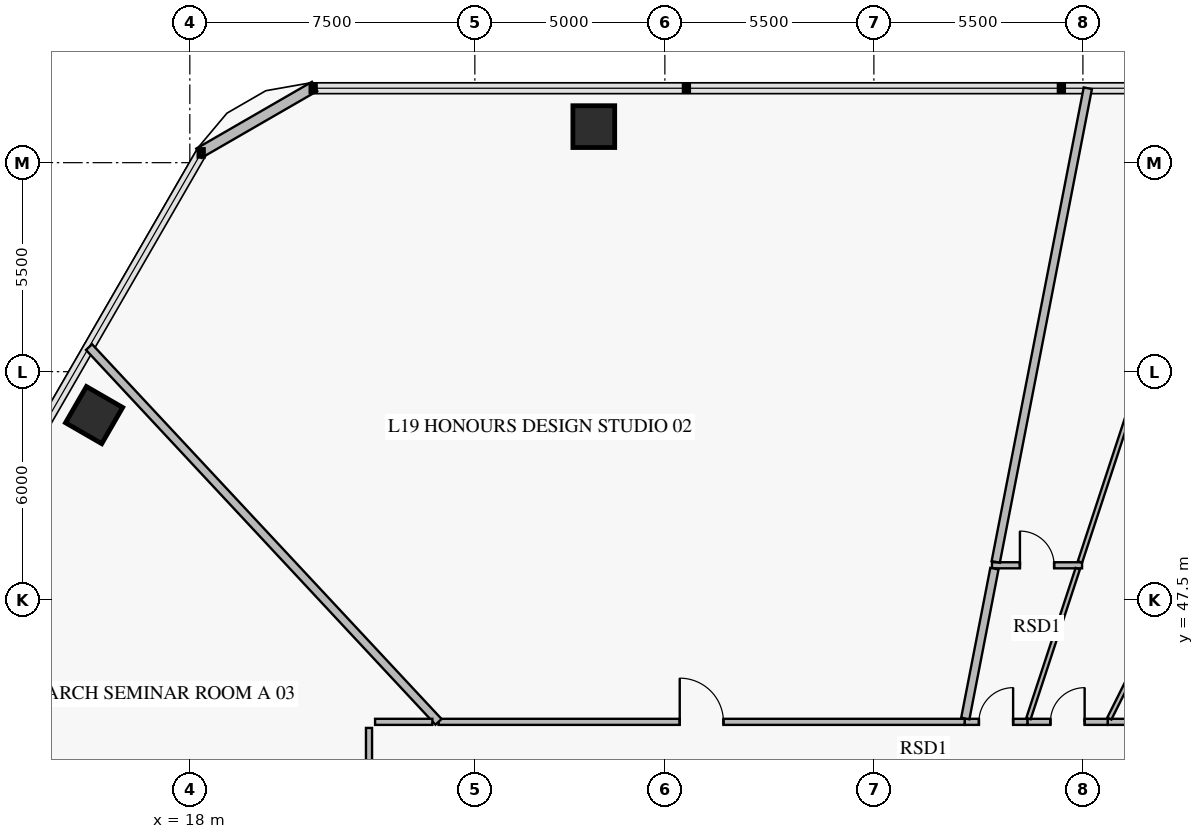
"""IFC4 building model, lengths in metres.
Left out: names, types, materials, properties, quantities, classifications, styles, units other than length and angle.
Written with IfcOpenShell. Run it as: python <this file> out.ifc"""

import sys

from ifc_helpers import new_model, si_unit, direction, frame, frame_2d, origin, origin_2d, place, context, subcontext, project, spatial, rectangle, extrude, element, fill, save


model = new_model("IFC4")
c1 = context("Model", 3, precision=1e-05, world=origin(), true_north=direction((0.0, 1.0)))
c2 = subcontext(c1, "Body", "Model", "MODEL_VIEW")
j1 = project(units=[si_unit("LENGTHUNIT", "METRE"), si_unit("PLANEANGLEUNIT", "RADIAN")], contexts=[c1])
p1 = place(None, origin())
s1 = spatial("IfcSite", under=j1, at=p1, CompositionType="ELEMENT")
p2 = place(p1, origin())
s2 = spatial("IfcBuilding", under=s1, at=p2, CompositionType="ELEMENT")
p3 = place(p2, frame((0.0, 0.0, 79.2)))
s3 = spatial("IfcBuildingStorey", under=s2, at=p3, CompositionType="ELEMENT", Elevation=79.2)
for number, where, z_axis, x_axis in (
    (1, (28.63, 59.948, 0.0), (0.0, 0.0, 1.0), (-1.0, 0.0, 0.0)),
    (2, (15.481, 52.357, 0.0), (0.0, 0.0, 1.0), (-0.5, -0.866, 0.0)),
):
    element("IfcColumn", number, at=place(p3, frame(where, z_axis=z_axis, x_axis=x_axis)), inside=s3, PredefinedType="COLUMN", context=c2, shape_type="SweptSolid", body=[
        extrude(rectangle(XDim=1.1, YDim=1.1, at=origin_2d()), origin(), (0.0, 0.0, 1.0), 3.92),
    ])
p4 = place(p3, frame((18.239, 59.249, 0.0), z_axis=(0.0, 0.0, 1.0), x_axis=(0.866007452331, 0.500031091541, 0.0)))
e3 = element("IfcWall", 3, at=p4, inside=s3, PredefinedType="SOLIDWALL", context=c2, shape_type="SweptSolid", body=[
    extrude(rectangle(XDim=3.515, YDim=0.28, at=frame_2d((1.757, 0.0))), origin(), (0.0, 0.0, 1.0), 3.92),
])
p5 = place(p3, frame((44.602, 44.285, 0.0), z_axis=(0.0, 0.0, 1.0), x_axis=(-1.0, 0.0, 0.0)))
e4 = element("IfcWall", 4, at=p5, inside=s3, PredefinedType="PARTITIONING", context=c2, shape_type="SweptSolid", body=[
    extrude(rectangle(XDim=2.45, YDim=0.16, at=frame_2d((1.225, 0.0))), origin(), (0.0, 0.0, 1.0), 3.92),
])
p6 = place(p5, frame((0.775, 0.0, 0.0)))
e5 = element("IfcOpeningElement", 5, at=p6, cuts=e4, PredefinedType="OPENING", context=c2, shape_type="SweptSolid", body=[
    extrude(rectangle(XDim=0.9, YDim=2.1, at=frame_2d((0.45, 1.05))), frame((0.0, 0.092, 0.0), z_axis=(0.0, -1.0, 0.0), x_axis=(1.0, 0.0, 0.0)), (0.0, 0.0, 1.0), 0.184),
])
p7 = place(p3, frame((42.152, 44.285, 0.0), z_axis=(0.0, 0.0, 1.0), x_axis=(-1.0, 0.0, 0.0)))
e6 = element("IfcWall", 6, at=p7, inside=s3, PredefinedType="PARTITIONING", context=c2, shape_type="SweptSolid", body=[
    extrude(rectangle(XDim=2.113, YDim=0.16, at=frame_2d((1.056, 0.0))), origin(), (0.0, 0.0, 1.0), 3.92),
])
p8 = place(p7, frame((0.606, 0.0, 0.0)))
e7 = element("IfcOpeningElement", 7, at=p8, cuts=e6, PredefinedType="OPENING", context=c2, shape_type="SweptSolid", body=[
    extrude(rectangle(XDim=0.9, YDim=2.1, at=frame_2d((0.45, 1.05))), frame((0.0, 0.092, 0.0), z_axis=(0.0, -1.0, 0.0), x_axis=(1.0, 0.0, 0.0)), (0.0, 0.0, 1.0), 0.184),
])
p9 = place(p3, frame((39.107, 48.405, 0.0), z_axis=(0.0, 0.0, 1.0), x_axis=(1.0, 0.0, 0.0)))
e8 = element("IfcWall", 8, at=p9, inside=s3, PredefinedType="PARTITIONING", context=c2, shape_type="SweptSolid", body=[
    extrude(rectangle(XDim=2.37, YDim=0.16, at=frame_2d((1.185, 0.0))), origin(), (0.0, 0.0, 1.0), 3.22),
])
p10 = place(p9, frame((0.735, 0.0, 0.0)))
e9 = element("IfcOpeningElement", 9, at=p10, cuts=e8, PredefinedType="OPENING", context=c2, shape_type="SweptSolid", body=[
    extrude(rectangle(XDim=0.9, YDim=2.1, at=frame_2d((0.45, 1.05))), frame((0.0, 0.092, 0.0), z_axis=(0.0, -1.0, 0.0), x_axis=(1.0, 0.0, 0.0)), (0.0, 0.0, 1.0), 0.184),
])
p11 = place(p3, frame((40.039, 44.285, 0.0), z_axis=(0.0, 0.0, 1.0), x_axis=(-1.0, 0.0, 0.0)))
e10 = element("IfcWall", 10, at=p11, inside=s3, PredefinedType="PARTITIONING", context=c2, shape_type="SweptSolid", body=[
    extrude(rectangle(XDim=1.651, YDim=0.16, at=frame_2d((0.826, 0.0))), origin(), (0.0, 0.0, 1.0), 3.22),
])
p12 = place(p11, frame((0.375, 0.0, 0.0)))
e11 = element("IfcOpeningElement", 11, at=p12, cuts=e10, PredefinedType="OPENING", context=c2, shape_type="SweptSolid", body=[
    extrude(rectangle(XDim=0.9, YDim=2.1, at=frame_2d((0.45, 1.05))), frame((0.0, 0.092, 0.0), z_axis=(0.0, -1.0, 0.0), x_axis=(1.0, 0.0, 0.0)), (0.0, 0.0, 1.0), 0.184),
])
p13 = place(p3, frame((38.388, 44.285, 0.0), z_axis=(0.0, 0.0, 1.0), x_axis=(-1.0, 0.0, 0.0)))
e12 = element("IfcWall", 12, at=p13, inside=s3, PredefinedType="PARTITIONING", context=c2, shape_type="SweptSolid", body=[
    extrude(rectangle(XDim=13.844, YDim=0.16, at=frame_2d((6.922, 0.0))), origin(), (0.0, 0.0, 1.0), 3.22),
])
p14 = place(p13, frame((6.347, 0.0, 0.0)))
e13 = element("IfcOpeningElement", 13, at=p14, cuts=e12, PredefinedType="OPENING", context=c2, shape_type="SweptSolid", body=[
    extrude(rectangle(XDim=1.15, YDim=2.2, at=frame_2d((0.575, 1.1))), frame((0.0, 0.092, 0.0), z_axis=(0.0, -1.0, 0.0), x_axis=(1.0, 0.0, 0.0)), (0.0, 0.0, 1.0), 0.184),
])
p15 = place(p3, frame((22.715, 44.125, 0.0), z_axis=(0.0, 0.0, 1.0), x_axis=(0.0, -1.0, 0.0)))
e14 = element("IfcWall", 14, at=p15, inside=s3, PredefinedType="PARTITIONING", context=c2, shape_type="SweptSolid", body=[
    extrude(rectangle(XDim=7.29, YDim=0.16, at=frame_2d((3.645, 0.0))), origin(), (0.0, 0.0, 1.0), 3.92),
])
p16 = place(p15, frame((3.07, 0.0, 0.0)))
e15 = element("IfcOpeningElement", 15, at=p16, cuts=e14, PredefinedType="OPENING", context=c2, shape_type="SweptSolid", body=[
    extrude(rectangle(XDim=1.15, YDim=2.2, at=frame_2d((0.575, 1.1))), frame((0.0, 0.092, 0.0), z_axis=(0.0, -1.0, 0.0), x_axis=(1.0, 0.0, 0.0)), (0.0, 0.0, 1.0), 0.184),
])
p17 = place(p3, frame((42.196, 44.373, 0.0), z_axis=(0.0, 0.0, 1.0), x_axis=(0.447750531228, 0.89415852162, 0.0)))
e16 = element("IfcWall", 16, at=p17, inside=s3, PredefinedType="PARTITIONING", context=c2, shape_type="SweptSolid", body=[
    extrude(rectangle(XDim=18.549, YDim=0.12, at=frame_2d((9.274, 0.0))), origin(), (0.0, 0.0, 1.0), 3.17),
])
p18 = place(p3, frame((40.068, 44.373, 0.0), z_axis=(0.0, 0.0, 1.0), x_axis=(0.312326163944, 0.949974929835, 0.0)))
e17 = element("IfcWall", 17, at=p18, inside=s3, PredefinedType="PARTITIONING", context=c2, shape_type="SweptSolid", body=[
    extrude(rectangle(XDim=4.152, YDim=0.12, at=frame_2d((2.076, 0.0))), origin(), (0.0, 0.0, 1.0), 3.92),
])
p19 = place(p3, frame((41.423, 48.493, 0.0), z_axis=(0.0, 0.0, 1.0), x_axis=(0.312329125199, 0.949973956249, 0.0)))
e18 = element("IfcWall", 18, at=p19, inside=s3, PredefinedType="PARTITIONING", context=c2, shape_type="SweptSolid", body=[
    extrude(rectangle(XDim=13.122, YDim=0.12, at=frame_2d((6.561, 0.0))), origin(), (0.0, 0.0, 1.0), 3.17),
])
p20 = place(p3, frame((38.405, 44.373, 0.0), z_axis=(0.0, 0.0, 1.0), x_axis=(0.190807852756, 0.98162740555, 0.0)))
e19 = element("IfcWall", 19, at=p20, inside=s3, PredefinedType="PARTITIONING", context=c2, shape_type="SweptSolid", body=[
    extrude(rectangle(XDim=4.018, YDim=0.22, at=frame_2d((2.009, 0.0))), origin(), (0.0, 0.0, 1.0), 3.92),
])
p21 = place(p3, frame((39.206, 48.493, 0.0), z_axis=(0.0, 0.0, 1.0), x_axis=(0.190811511044, 0.981626694448, 0.0)))
e20 = element("IfcWall", 20, at=p21, inside=s3, PredefinedType="PARTITIONING", context=c2, shape_type="SweptSolid", body=[
    extrude(rectangle(XDim=12.699, YDim=0.22, at=frame_2d((6.35, 0.0))), origin(), (0.0, 0.0, 1.0), 3.17),
])
p22 = place(p3, frame((24.544, 44.285, 0.0), z_axis=(0.0, 0.0, 1.0), x_axis=(-0.68200725148, 0.731345410137, 0.0)))
e21 = element("IfcWall", 21, at=p22, inside=s3, PredefinedType="PARTITIONING", context=c2, shape_type="SweptSolid", body=[
    extrude(rectangle(XDim=13.484, YDim=0.22, at=frame_2d((6.742, 0.0))), origin(), (0.0, 0.0, 1.0), 3.17),
])
p23 = place(p3, frame((24.383, 44.285, 0.0), z_axis=(0.0, 0.0, 1.0), x_axis=(-1.0, 0.0, 0.0)))
e22 = element("IfcWall", 22, at=p23, inside=s3, PredefinedType="PARTITIONING", context=c2, shape_type="SweptSolid", body=[
    extrude(rectangle(XDim=1.508, YDim=0.16, at=frame_2d((0.754, 0.0))), origin(), (0.0, 0.0, 1.0), 3.22),
])
p24 = place(p8, frame((0.9, 0.0, 0.0), z_axis=(0.0, 0.0, 1.0), x_axis=(-1.0, 0.0, 0.0)))
e23 = element("IfcDoor", 23, at=p24, inside=s3, OperationType="SINGLE_SWING_RIGHT", PredefinedType="DOOR", context=c2, shape_type="SweptSolid", body=[
    extrude(rectangle(XDim=0.9, YDim=2.1, at=frame_2d((0.45, 1.05))), frame((0.0, 0.025, 0.0), z_axis=(0.0, -1.0, 0.0), x_axis=(1.0, 0.0, 0.0)), (0.0, 0.0, 1.0), 0.05),
])
fill(e7, e23)
p25 = place(p10, origin())
e24 = element("IfcDoor", 24, at=p25, inside=s3, OperationType="SINGLE_SWING_LEFT", PredefinedType="DOOR", context=c2, shape_type="SweptSolid", body=[
    extrude(rectangle(XDim=0.9, YDim=2.1, at=frame_2d((0.45, 1.05))), frame((0.0, 0.025, 0.0), z_axis=(0.0, -1.0, 0.0), x_axis=(1.0, 0.0, 0.0)), (0.0, 0.0, 1.0), 0.05),
])
fill(e9, e24)
p26 = place(p12, frame((0.9, 0.0, 0.0), z_axis=(0.0, 0.0, 1.0), x_axis=(-1.0, 0.0, 0.0)))
e25 = element("IfcDoor", 25, at=p26, inside=s3, OperationType="SINGLE_SWING_RIGHT", PredefinedType="DOOR", context=c2, shape_type="SweptSolid", body=[
    extrude(rectangle(XDim=0.9, YDim=2.1, at=frame_2d((0.45, 1.05))), frame((0.0, 0.025, 0.0), z_axis=(0.0, -1.0, 0.0), x_axis=(1.0, 0.0, 0.0)), (0.0, 0.0, 1.0), 0.05),
])
fill(e11, e25)
p27 = place(p14, frame((1.15, 0.0, 0.0), z_axis=(0.0, 0.0, 1.0), x_axis=(-1.0, 0.0, 0.0)))
e26 = element("IfcDoor", 26, at=p27, inside=s3, OperationType="SINGLE_SWING_LEFT", PredefinedType="DOOR", context=c2, shape_type="SweptSolid", body=[
    extrude(rectangle(XDim=1.15, YDim=2.2, at=frame_2d((0.575, 1.1))), frame((0.0, 0.025, 0.0), z_axis=(0.0, -1.0, 0.0), x_axis=(1.0, 0.0, 0.0)), (0.0, 0.0, 1.0), 0.05),
])
fill(e13, e26)
save(model, sys.argv[1])
